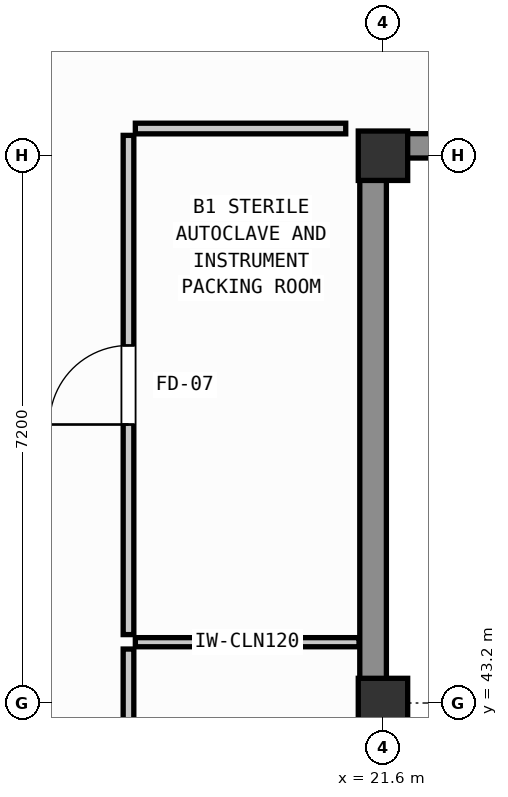
"""IFC4 building model, lengths in metres.
Left out: names, types, materials, properties, quantities, classifications, styles, units other than length and angle.
Written with IfcOpenShell. Run it as: python <this file> out.ifc"""

import sys

from ifc_helpers import new_model, si_unit, direction, frame, frame_2d, origin, origin_2d, place, context, subcontext, project, spatial, rectangle, extrude, element, fill, save


model = new_model("IFC4")
c1 = context("Model", 3, precision=1e-05, world=origin(), true_north=direction((0.0, 1.0)))
c2 = subcontext(c1, "Body", "Model", "MODEL_VIEW")
j1 = project(units=[si_unit("LENGTHUNIT", "METRE"), si_unit("PLANEANGLEUNIT", "RADIAN")], contexts=[c1])
p1 = place(None, origin())
s1 = spatial("IfcSite", under=j1, at=p1, CompositionType="ELEMENT")
p2 = place(p1, origin())
s2 = spatial("IfcBuilding", under=s1, at=p2, CompositionType="ELEMENT")
p3 = place(p2, frame((0.0, 0.0, -4.5)))
s3 = spatial("IfcBuildingStorey", under=s2, at=p3, CompositionType="ELEMENT", Elevation=-4.5)
for number, where, z_axis, x_axis in (
    (1, (21.6, 43.2, -0.5), (0.0, 0.0, 1.0), (1.0, 0.0, 0.0)),
    (2, (21.6, 50.4, -0.5), (0.0, 0.0, 1.0), (1.0, 0.0, 0.0)),
):
    element("IfcColumn", number, at=place(p3, frame(where, z_axis=z_axis, x_axis=x_axis)), inside=s3, PredefinedType="COLUMN", context=c2, shape_type="SweptSolid", body=[
        extrude(rectangle(XDim=0.65, YDim=0.65, at=origin_2d()), origin(), (0.0, 0.0, 1.0), 4.75),
    ])
p4 = place(p3, frame((28.48, 50.53, 0.0), z_axis=(0.0, 0.0, 1.0), x_axis=(-1.0, 0.0, 0.0)))
e3 = element("IfcWall", 3, at=p4, inside=s3, PredefinedType="SOLIDWALL", context=c2, shape_type="SweptSolid", body=[
    extrude(rectangle(XDim=6.56, YDim=0.32, at=frame_2d((3.28, 0.0))), origin(), (0.0, 0.0, 1.0), 4.25),
])
p5 = place(p3, frame((21.47, 50.08, 0.0), z_axis=(0.0, 0.0, 1.0), x_axis=(0.0, -1.0, 0.0)))
e4 = element("IfcWall", 4, at=p5, inside=s3, PredefinedType="SOLIDWALL", context=c2, shape_type="SweptSolid", body=[
    extrude(rectangle(XDim=6.56, YDim=0.35, at=frame_2d((3.28, 0.0))), origin(), (0.0, 0.0, 1.0), 4.25),
])
p6 = place(p3, frame((18.25, 30.89, 0.0), z_axis=(0.0, 0.0, 1.0), x_axis=(0.000150009374, 0.999999988749, 0.0)))
e5 = element("IfcWall", 5, at=p6, inside=s3, PredefinedType="PARTITIONING", context=c2, shape_type="SweptSolid", body=[
    extrude(rectangle(XDim=13.02, YDim=0.14, at=frame_2d((6.51, 0.0))), origin(), (0.0, 0.0, 1.0), 3.4),
])
p7 = place(p6, frame((5.95, 0.0, 0.0)))
e6 = element("IfcOpeningElement", 6, at=p7, cuts=e5, PredefinedType="OPENING", context=c2, shape_type="SweptSolid", body=[
    extrude(rectangle(XDim=1.12, YDim=2.14, at=frame_2d((0.56, 1.07))), frame((0.0, 0.08, 0.0), z_axis=(0.0, -1.0, 0.0), x_axis=(1.0, 0.0, 0.0)), (0.0, 0.0, 1.0), 0.16),
])
p8 = place(p3, frame((18.342, 44.0, 0.0), z_axis=(0.0, 0.0, 1.0), x_axis=(1.0, 0.0, 0.0)))
e7 = element("IfcWall", 7, at=p8, inside=s3, PredefinedType="PARTITIONING", context=c2, shape_type="SweptSolid", body=[
    extrude(rectangle(XDim=2.943, YDim=0.12, at=frame_2d((1.471, 0.0))), origin(), (0.0, 0.0, 1.0), 3.55),
])
p9 = place(p3, frame((18.252, 44.1, 0.0), z_axis=(0.0, 0.0, 1.0), x_axis=(0.0, 1.0, 0.0)))
e8 = element("IfcWall", 8, at=p9, inside=s3, PredefinedType="PARTITIONING", context=c2, shape_type="SweptSolid", body=[
    extrude(rectangle(XDim=6.568, YDim=0.14, at=frame_2d((3.284, 0.0))), origin(), (0.0, 0.0, 1.0), 3.4),
])
p10 = place(p9, frame((2.764, 0.0, 0.0)))
e9 = element("IfcOpeningElement", 9, at=p10, cuts=e8, PredefinedType="OPENING", context=c2, shape_type="SweptSolid", body=[
    extrude(rectangle(XDim=1.04, YDim=2.12, at=frame_2d((0.52, 1.06))), frame((0.0, 0.08, 0.0), z_axis=(0.0, -1.0, 0.0), x_axis=(1.0, 0.0, 0.0)), (0.0, 0.0, 1.0), 0.16),
])
p11 = place(p3, frame((18.342, 50.758, 0.0), z_axis=(0.0, 0.0, 1.0), x_axis=(1.0, 0.0, 0.0)))
e10 = element("IfcWall", 10, at=p11, inside=s3, PredefinedType="PARTITIONING", context=c2, shape_type="SweptSolid", body=[
    extrude(rectangle(XDim=2.768, YDim=0.14, at=frame_2d((1.384, 0.0))), origin(), (0.0, 0.0, 1.0), 3.4),
])
p12 = place(p10, origin())
e11 = element("IfcDoor", 11, at=p12, inside=s3, OperationType="SINGLE_SWING_RIGHT", PredefinedType="DOOR", context=c2, shape_type="SweptSolid", body=[
    extrude(rectangle(XDim=1.04, YDim=2.12, at=frame_2d((0.52, 1.06))), frame((0.0, 0.025, 0.0), z_axis=(0.0, -1.0, 0.0), x_axis=(1.0, 0.0, 0.0)), (0.0, 0.0, 1.0), 0.05),
])
fill(e9, e11)
save(model, sys.argv[1])
